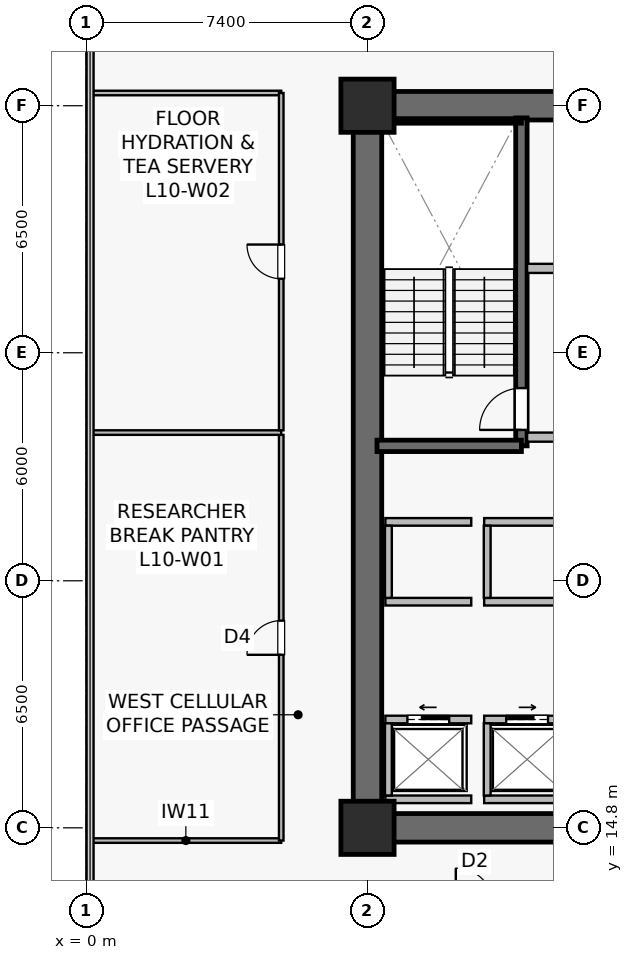
"""IFC4 building model, lengths in metres.
Left out: names, types, materials, properties, quantities, classifications, styles, units other than length and angle.
Written with IfcOpenShell. Run it as: python <this file> out.ifc"""

import sys

from ifc_helpers import new_model, si_unit, direction, frame, frame_2d, origin, origin_2d, place, context, subcontext, project, spatial, rectangle, extrude, source, transform, mapped, element, fill, save


model = new_model("IFC4")
c1 = context("Model", 3, precision=1e-05, world=origin(), true_north=direction((0.0, 1.0)))
c2 = subcontext(c1, "Body", "Model", "MODEL_VIEW")
j1 = project(units=[si_unit("LENGTHUNIT", "METRE"), si_unit("PLANEANGLEUNIT", "RADIAN")], contexts=[c1])
p1 = place(None, origin())
s1 = spatial("IfcSite", under=j1, at=p1, CompositionType="ELEMENT")
p2 = place(p1, origin())
s2 = spatial("IfcBuilding", under=s1, at=p2, CompositionType="ELEMENT")
p3 = place(p2, frame((0.0, 0.0, 41.6)))
s3 = spatial("IfcBuildingStorey", under=s2, at=p3, CompositionType="ELEMENT", Elevation=41.6)
p4 = place(p3, frame((7.025, 14.8, 0.0), z_axis=(0.0, 0.0, 1.0), x_axis=(1.0, 0.0, 0.0)))
e1 = element("IfcWall", 1, at=p4, inside=s3, PredefinedType="SHEAR", context=c2, shape_type="SweptSolid", body=[
    extrude(rectangle(XDim=15.55, YDim=0.75, at=frame_2d((7.775, 0.0))), origin(), (0.0, 0.0, 1.0), 3.78),
])
p5 = place(p3, frame((7.025, 33.8, 0.0), z_axis=(0.0, 0.0, 1.0), x_axis=(1.0, 0.0, 0.0)))
e2 = element("IfcWall", 2, at=p5, inside=s3, PredefinedType="SHEAR", context=c2, shape_type="SweptSolid", body=[
    extrude(rectangle(XDim=15.55, YDim=0.75, at=frame_2d((7.775, 0.0))), origin(), (0.0, 0.0, 1.0), 3.78),
])
p6 = place(p5, frame((6.875, 0.0, 0.0)))
e3 = element("IfcOpeningElement", 3, at=p6, cuts=e2, PredefinedType="OPENING", context=c2, shape_type="SweptSolid", body=[
    extrude(rectangle(XDim=0.95, YDim=2.15, at=frame_2d((0.475, 1.075))), frame((0.0, 0.385, 0.0), z_axis=(0.0, -1.0, 0.0), x_axis=(1.0, 0.0, 0.0)), (0.0, 0.0, 1.0), 0.77),
])
p7 = place(p5, frame((11.94, 0.0, 0.0)))
e4 = element("IfcOpeningElement", 4, at=p7, cuts=e2, PredefinedType="OPENING", context=c2, shape_type="SweptSolid", body=[
    extrude(rectangle(XDim=0.95, YDim=2.15, at=frame_2d((0.475, 1.075))), frame((0.0, 0.385, 0.0), z_axis=(0.0, -1.0, 0.0), x_axis=(1.0, 0.0, 0.0)), (0.0, 0.0, 1.0), 0.77),
])
p8 = place(p3, frame((7.4, 15.175, 0.0), z_axis=(0.0, 0.0, 1.0), x_axis=(0.0, 1.0, 0.0)))
e5 = element("IfcWall", 5, at=p8, inside=s3, PredefinedType="SHEAR", context=c2, shape_type="SweptSolid", body=[
    extrude(rectangle(XDim=18.25, YDim=0.75, at=frame_2d((9.125, 0.0))), origin(), (0.0, 0.0, 1.0), 3.78),
])
p9 = place(p3, frame((11.45, 24.85, 0.0), z_axis=(0.0, 0.0, 1.0), x_axis=(0.0, 1.0, 0.0)))
e6 = element("IfcWall", 6, at=p9, inside=s3, PredefinedType="SHEAR", context=c2, shape_type="SweptSolid", body=[
    extrude(rectangle(XDim=8.63, YDim=0.3, at=frame_2d((4.315, 0.0))), origin(), (0.0, 0.0, 1.0), 3.78),
])
p10 = place(p9, frame((0.42, 0.0, 0.0)))
e7 = element("IfcOpeningElement", 7, at=p10, cuts=e6, PredefinedType="OPENING", context=c2, shape_type="SweptSolid", body=[
    extrude(rectangle(XDim=1.1, YDim=2.15, at=frame_2d((0.55, 1.075))), frame((0.0, 0.16, 0.0), z_axis=(0.0, -1.0, 0.0), x_axis=(1.0, 0.0, 0.0)), (0.0, 0.0, 1.0), 0.32),
])
p11 = place(p3, frame((7.65, 24.85, 0.0), z_axis=(0.0, 0.0, 1.0), x_axis=(1.0, 0.0, 0.0)))
e8 = element("IfcWall", 8, at=p11, inside=s3, PredefinedType="SHEAR", context=c2, shape_type="SweptSolid", body=[
    extrude(rectangle(XDim=3.8, YDim=0.3, at=frame_2d((1.9, 0.0))), origin(), (0.0, 0.0, 1.0), 3.78),
])
p12 = place(p3, frame((7.73, 33.4, 0.0), z_axis=(0.0, 0.0, 1.0), x_axis=(1.0, 0.0, 0.0)))
e9 = element("IfcWall", 9, at=p12, inside=s3, PredefinedType="SOLIDWALL", context=c2, shape_type="SweptSolid", body=[
    extrude(rectangle(XDim=3.72, YDim=0.12, at=frame_2d((1.86, 0.0))), origin(), (0.0, 0.0, 1.0), 3.78),
])
m1 = source(origin(), c2, "Body", "SweptSolid", [
    extrude(rectangle(XDim=1.4, YDim=1.4, at=origin_2d()), origin(), (0.0, 0.0, 1.0), 4.1),
])
for number, where, z_axis, x_axis in (
    (10, (7.4, 14.8, 0.0), (0.0, 0.0, 1.0), (1.0, 0.0, 0.0)),
    (11, (7.4, 33.8, 0.0), (0.0, 0.0, 1.0), (1.0, 0.0, 0.0)),
):
    element("IfcColumn", number, at=place(p3, frame(where, z_axis=z_axis, x_axis=x_axis)), inside=s3, PredefinedType="COLUMN", context=c2, shape_type="MappedRepresentation", body=[
        mapped(m1, transform((0.0, 0.0, 0.0), scale=1.0)),
    ])
p13 = place(p3, frame((11.6, 25.08, 0.0), z_axis=(0.0, 0.0, 1.0), x_axis=(1.0, 0.0, 0.0)))
e12 = element("IfcWall", 12, at=p13, inside=s3, PredefinedType="SOLIDWALL", context=c2, shape_type="SweptSolid", body=[
    extrude(rectangle(XDim=6.92, YDim=0.24, at=frame_2d((3.46, 0.0))), origin(), (0.0, 0.0, 1.0), 3.065),
])
p14 = place(p13, frame((2.6, 0.0, 0.0)))
e13 = element("IfcOpeningElement", 13, at=p14, cuts=e12, PredefinedType="OPENING", context=c2, shape_type="SweptSolid", body=[
    extrude(rectangle(XDim=1.2, YDim=2.16, at=frame_2d((0.6, 1.08))), frame((0.0, 0.13, 0.0), z_axis=(0.0, -1.0, 0.0), x_axis=(1.0, 0.0, 0.0)), (0.0, 0.0, 1.0), 0.26),
])
p15 = place(p3, frame((11.6, 29.52, 0.0), z_axis=(0.0, 0.0, 1.0), x_axis=(1.0, 0.0, 0.0)))
e14 = element("IfcWall", 14, at=p15, inside=s3, PredefinedType="SOLIDWALL", context=c2, shape_type="SweptSolid", body=[
    extrude(rectangle(XDim=6.92, YDim=0.24, at=frame_2d((3.46, 0.0))), origin(), (0.0, 0.0, 1.0), 3.065),
])
p16 = place(p3, frame((7.87, 17.65, 0.0), z_axis=(0.0, 0.0, 1.0), x_axis=(1.0, 0.0, 0.0)))
e15 = element("IfcWall", 15, at=p16, inside=s3, PredefinedType="SOLIDWALL", context=c2, shape_type="SweptSolid", body=[
    extrude(rectangle(XDim=2.26, YDim=0.2, at=frame_2d((1.13, 0.0))), origin(), (0.0, 0.0, 1.0), 3.78),
])
p17 = place(p16, frame((0.58, 0.0, 0.0)))
e16 = element("IfcOpeningElement", 16, at=p17, cuts=e15, PredefinedType="OPENING", context=c2, shape_type="SweptSolid", body=[
    extrude(rectangle(XDim=1.1, YDim=2.22, at=frame_2d((0.55, 1.11))), frame((0.0, 0.11, 0.0), z_axis=(0.0, -1.0, 0.0), x_axis=(1.0, 0.0, 0.0)), (0.0, 0.0, 1.0), 0.22),
])
p18 = place(p3, frame((7.87, 15.55, 0.0), z_axis=(0.0, 0.0, 1.0), x_axis=(1.0, 0.0, 0.0)))
e17 = element("IfcWall", 17, at=p18, inside=s3, PredefinedType="SOLIDWALL", context=c2, shape_type="SweptSolid", body=[
    extrude(rectangle(XDim=2.26, YDim=0.2, at=frame_2d((1.13, 0.0))), origin(), (0.0, 0.0, 1.0), 3.78),
])
p19 = place(p3, frame((7.95, 15.65, 0.0), z_axis=(0.0, 0.0, 1.0), x_axis=(0.0, 1.0, 0.0)))
e18 = element("IfcWall", 18, at=p19, inside=s3, PredefinedType="SOLIDWALL", context=c2, shape_type="SweptSolid", body=[
    extrude(rectangle(XDim=1.9, YDim=0.18, at=frame_2d((0.95, 0.0))), origin(), (0.0, 0.0, 1.0), 3.78),
])
p20 = place(p3, frame((10.47, 17.65, 0.0), z_axis=(0.0, 0.0, 1.0), x_axis=(1.0, 0.0, 0.0)))
e19 = element("IfcWall", 19, at=p20, inside=s3, PredefinedType="SOLIDWALL", context=c2, shape_type="SweptSolid", body=[
    extrude(rectangle(XDim=2.26, YDim=0.2, at=frame_2d((1.13, 0.0))), origin(), (0.0, 0.0, 1.0), 3.78),
])
p21 = place(p20, frame((0.58, 0.0, 0.0)))
e20 = element("IfcOpeningElement", 20, at=p21, cuts=e19, PredefinedType="OPENING", context=c2, shape_type="SweptSolid", body=[
    extrude(rectangle(XDim=1.1, YDim=2.22, at=frame_2d((0.55, 1.11))), frame((0.0, 0.11, 0.0), z_axis=(0.0, -1.0, 0.0), x_axis=(1.0, 0.0, 0.0)), (0.0, 0.0, 1.0), 0.22),
])
p22 = place(p3, frame((10.47, 15.55, 0.0), z_axis=(0.0, 0.0, 1.0), x_axis=(1.0, 0.0, 0.0)))
e21 = element("IfcWall", 21, at=p22, inside=s3, PredefinedType="SOLIDWALL", context=c2, shape_type="SweptSolid", body=[
    extrude(rectangle(XDim=2.26, YDim=0.2, at=frame_2d((1.13, 0.0))), origin(), (0.0, 0.0, 1.0), 3.78),
])
p23 = place(p3, frame((10.55, 15.65, 0.0), z_axis=(0.0, 0.0, 1.0), x_axis=(0.0, 1.0, 0.0)))
e22 = element("IfcWall", 22, at=p23, inside=s3, PredefinedType="SOLIDWALL", context=c2, shape_type="SweptSolid", body=[
    extrude(rectangle(XDim=1.9, YDim=0.18, at=frame_2d((0.95, 0.0))), origin(), (0.0, 0.0, 1.0), 3.78),
])
for number, where, z_axis, x_axis in (
    (23, (7.87, 20.75, 0.0), (0.0, 0.0, 1.0), (1.0, 0.0, 0.0)),
    (24, (7.87, 22.85, 0.0), (0.0, 0.0, 1.0), (1.0, 0.0, 0.0)),
):
    element("IfcWall", number, at=place(p3, frame(where, z_axis=z_axis, x_axis=x_axis)), inside=s3, PredefinedType="SOLIDWALL", context=c2, shape_type="SweptSolid", body=[
        extrude(rectangle(XDim=2.26, YDim=0.2, at=frame_2d((1.13, 0.0))), origin(), (0.0, 0.0, 1.0), 3.78),
    ])
p24 = place(p3, frame((7.95, 20.85, 0.0), z_axis=(0.0, 0.0, 1.0), x_axis=(0.0, 1.0, 0.0)))
e25 = element("IfcWall", 25, at=p24, inside=s3, PredefinedType="SOLIDWALL", context=c2, shape_type="SweptSolid", body=[
    extrude(rectangle(XDim=1.9, YDim=0.18, at=frame_2d((0.95, 0.0))), origin(), (0.0, 0.0, 1.0), 3.78),
])
for number, where, z_axis, x_axis in (
    (26, (10.47, 20.75, 0.0), (0.0, 0.0, 1.0), (1.0, 0.0, 0.0)),
    (27, (10.47, 22.85, 0.0), (0.0, 0.0, 1.0), (1.0, 0.0, 0.0)),
):
    element("IfcWall", number, at=place(p3, frame(where, z_axis=z_axis, x_axis=x_axis)), inside=s3, PredefinedType="SOLIDWALL", context=c2, shape_type="SweptSolid", body=[
        extrude(rectangle(XDim=2.26, YDim=0.2, at=frame_2d((1.13, 0.0))), origin(), (0.0, 0.0, 1.0), 3.78),
    ])
p25 = place(p3, frame((10.55, 20.85, 0.0), z_axis=(0.0, 0.0, 1.0), x_axis=(0.0, 1.0, 0.0)))
e28 = element("IfcWall", 28, at=p25, inside=s3, PredefinedType="SOLIDWALL", context=c2, shape_type="SweptSolid", body=[
    extrude(rectangle(XDim=1.9, YDim=0.18, at=frame_2d((0.95, 0.0))), origin(), (0.0, 0.0, 1.0), 3.78),
])
for number, where, z_axis, x_axis in (
    (29, (0.11, 14.465, 0.0), (0.0, 0.0, 1.0), (1.0, 0.0, 0.0)),
    (30, (0.11, 34.135, 0.0), (0.0, 0.0, 1.0), (1.0, 0.0, 0.0)),
):
    element("IfcWall", number, at=place(p3, frame(where, z_axis=z_axis, x_axis=x_axis)), inside=s3, PredefinedType="PARTITIONING", context=c2, shape_type="SweptSolid", body=[
        extrude(rectangle(XDim=5.02, YDim=0.12, at=frame_2d((2.51, 0.0))), origin(), (0.0, 0.0, 1.0), 3.78),
    ])
p26 = place(p3, frame((5.13, 14.465, 0.0), z_axis=(0.0, 0.0, 1.0), x_axis=(0.0, 1.0, 0.0)))
e31 = element("IfcWall", 31, at=p26, inside=s3, PredefinedType="PARTITIONING", context=c2, shape_type="SweptSolid", body=[
    extrude(rectangle(XDim=10.675, YDim=0.12, at=frame_2d((5.337, 0.0))), origin(), (0.0, 0.0, 1.0), 3.78),
])
p27 = place(p26, frame((4.887, 0.0, 0.0)))
e32 = element("IfcOpeningElement", 32, at=p27, cuts=e31, PredefinedType="OPENING", context=c2, shape_type="SweptSolid", body=[
    extrude(rectangle(XDim=0.9, YDim=2.1, at=frame_2d((0.45, 1.05))), frame((0.0, 0.07, 0.0), z_axis=(0.0, -1.0, 0.0), x_axis=(1.0, 0.0, 0.0)), (0.0, 0.0, 1.0), 0.14),
])
p28 = place(p3, frame((0.11, 25.2, 0.0), z_axis=(0.0, 0.0, 1.0), x_axis=(1.0, 0.0, 0.0)))
e33 = element("IfcWall", 33, at=p28, inside=s3, PredefinedType="PARTITIONING", context=c2, shape_type="SweptSolid", body=[
    extrude(rectangle(XDim=5.02, YDim=0.12, at=frame_2d((2.51, 0.0))), origin(), (0.0, 0.0, 1.0), 3.78),
])
p29 = place(p3, frame((5.13, 25.26, 0.0), z_axis=(0.0, 0.0, 1.0), x_axis=(0.0, 1.0, 0.0)))
e34 = element("IfcWall", 34, at=p29, inside=s3, PredefinedType="PARTITIONING", context=c2, shape_type="SweptSolid", body=[
    extrude(rectangle(XDim=8.875, YDim=0.12, at=frame_2d((4.438, 0.0))), origin(), (0.0, 0.0, 1.0), 3.78),
])
p30 = place(p29, frame((3.988, 0.0, 0.0)))
e35 = element("IfcOpeningElement", 35, at=p30, cuts=e34, PredefinedType="OPENING", context=c2, shape_type="SweptSolid", body=[
    extrude(rectangle(XDim=0.9, YDim=2.1, at=frame_2d((0.45, 1.05))), frame((0.0, 0.07, 0.0), z_axis=(0.0, -1.0, 0.0), x_axis=(1.0, 0.0, 0.0)), (0.0, 0.0, 1.0), 0.14),
])
m2 = source(origin(), c2, "Body", "SweptSolid", [
    extrude(rectangle(XDim=1.1, YDim=2.15, at=frame_2d((0.55, 1.075))), frame((0.0, 0.025, 0.0), z_axis=(0.0, -1.0, 0.0), x_axis=(1.0, 0.0, 0.0)), (0.0, 0.0, 1.0), 0.05),
])
p31 = place(p10, origin())
e36 = element("IfcDoor", 36, at=p31, inside=s3, OperationType="SINGLE_SWING_LEFT", PredefinedType="DOOR", context=c2, shape_type="MappedRepresentation", body=[
    mapped(m2, transform((0.0, 0.0, 0.0), scale=1.0)),
])
fill(e7, e36)
m3 = source(origin(), c2, "Body", "SweptSolid", [
    extrude(rectangle(XDim=1.1, YDim=2.22, at=frame_2d((0.55, 1.11))), frame((0.0, 0.025, 0.0), z_axis=(0.0, -1.0, 0.0), x_axis=(1.0, 0.0, 0.0)), (0.0, 0.0, 1.0), 0.05),
])
p32 = place(p17, origin())
e37 = element("IfcDoor", 37, at=p32, inside=s3, OperationType="SLIDING_TO_LEFT", PredefinedType="USERDEFINED", context=c2, shape_type="MappedRepresentation", body=[
    mapped(m3, transform((0.0, 0.0, 0.0), scale=1.0)),
])
fill(e16, e37)
p33 = place(p21, origin())
e38 = element("IfcDoor", 38, at=p33, inside=s3, OperationType="SLIDING_TO_RIGHT", PredefinedType="USERDEFINED", context=c2, shape_type="MappedRepresentation", body=[
    mapped(m3, transform((0.0, 0.0, 0.0), scale=1.0)),
])
fill(e20, e38)
m4 = source(origin(), c2, "Body", "SweptSolid", [
    extrude(rectangle(XDim=0.9, YDim=2.1, at=frame_2d((0.45, 1.05))), frame((0.0, 0.025, 0.0), z_axis=(0.0, -1.0, 0.0), x_axis=(1.0, 0.0, 0.0)), (0.0, 0.0, 1.0), 0.05),
])
p34 = place(p27, origin())
e39 = element("IfcDoor", 39, at=p34, inside=s3, OperationType="SINGLE_SWING_LEFT", PredefinedType="DOOR", context=c2, shape_type="MappedRepresentation", body=[
    mapped(m4, transform((0.0, 0.0, 0.0), scale=1.0)),
])
fill(e32, e39)
p35 = place(p30, origin())
e40 = element("IfcDoor", 40, at=p35, inside=s3, OperationType="SINGLE_SWING_RIGHT", PredefinedType="DOOR", context=c2, shape_type="MappedRepresentation", body=[
    mapped(m4, transform((0.0, 0.0, 0.0), scale=1.0)),
])
fill(e35, e40)
save(model, sys.argv[1])
